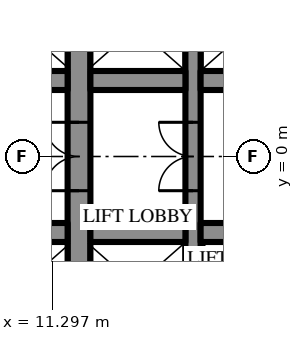
"""IFC4 building model, lengths in metres.
Left out: names, types, materials, properties, quantities, classifications, styles, units other than length and angle.
Written with IfcOpenShell. Run it as: python <this file> out.ifc"""

import sys

from ifc_helpers import new_model, si_unit, direction, frame, frame_2d, origin, place, context, subcontext, project, spatial, rectangle, extrude, element, fill, save


model = new_model("IFC4")
c1 = context("Model", 3, precision=1e-05, world=origin(), true_north=direction((0.0, 1.0)))
c2 = subcontext(c1, "Body", "Model", "MODEL_VIEW")
j1 = project(units=[si_unit("LENGTHUNIT", "METRE"), si_unit("PLANEANGLEUNIT", "RADIAN")], contexts=[c1])
p1 = place(None, origin())
s1 = spatial("IfcSite", under=j1, at=p1, CompositionType="ELEMENT")
p2 = place(p1, origin())
s2 = spatial("IfcBuilding", under=s1, at=p2, CompositionType="ELEMENT")
p3 = place(p2, frame((0.0, 0.0, 52.9)))
s3 = spatial("IfcBuildingStorey", under=s2, at=p3, CompositionType="ELEMENT", Elevation=52.9)
p4 = place(p3, frame((12.0, -10.7, 0.0), z_axis=(0.0, 0.0, 1.0), x_axis=(0.0, 1.0, 0.0)))
e1 = element("IfcWall", 1, at=p4, inside=s3, PredefinedType="SHEAR", context=c2, shape_type="SweptSolid", body=[
    extrude(rectangle(XDim=21.4, YDim=0.6, at=frame_2d((10.7, 0.0))), origin(), (0.0, 0.0, 1.0), 4.2),
])
p5 = place(p4, frame((9.8, 0.0, 0.0)))
e2 = element("IfcOpeningElement", 2, at=p5, cuts=e1, PredefinedType="OPENING", context=c2, shape_type="SweptSolid", body=[
    extrude(rectangle(XDim=1.8, YDim=2.4, at=frame_2d((0.9, 1.2))), frame((0.0, 0.31, 0.0), z_axis=(0.0, -1.0, 0.0), x_axis=(1.0, 0.0, 0.0)), (0.0, 0.0, 1.0), 0.62),
])
p6 = place(p3, frame((15.0, -10.7, 0.0), z_axis=(0.0, 0.0, 1.0), x_axis=(0.0, 1.0, 0.0)))
e3 = element("IfcWall", 3, at=p6, inside=s3, PredefinedType="SHEAR", context=c2, shape_type="SweptSolid", body=[
    extrude(rectangle(XDim=21.4, YDim=0.4, at=frame_2d((10.7, 0.0))), origin(), (0.0, 0.0, 1.0), 4.2),
])
p7 = place(p6, frame((9.8, 0.0, 0.0)))
e4 = element("IfcOpeningElement", 4, at=p7, cuts=e3, PredefinedType="OPENING", context=c2, shape_type="SweptSolid", body=[
    extrude(rectangle(XDim=1.8, YDim=2.4, at=frame_2d((0.9, 1.2))), frame((0.0, 0.21, 0.0), z_axis=(0.0, -1.0, 0.0), x_axis=(1.0, 0.0, 0.0)), (0.0, 0.0, 1.0), 0.42),
])
p8 = place(p3, frame((-3.2, 2.0, 0.0), z_axis=(0.0, 0.0, 1.0), x_axis=(1.0, 0.0, 0.0)))
e5 = element("IfcWall", 5, at=p8, inside=s3, PredefinedType="SHEAR", context=c2, shape_type="SweptSolid", body=[
    extrude(rectangle(XDim=14.9, YDim=0.5, at=frame_2d((7.45, 0.0))), origin(), (0.0, 0.0, 1.0), 4.2),
])
p9 = place(p8, frame((1.15, 0.0, 0.0)))
e6 = element("IfcOpeningElement", 6, at=p9, cuts=e5, PredefinedType="OPENING", context=c2, shape_type="SweptSolid", body=[
    extrude(rectangle(XDim=1.1, YDim=2.2, at=frame_2d((0.55, 1.1))), frame((0.0, 0.26, 0.0), z_axis=(0.0, -1.0, 0.0), x_axis=(1.0, 0.0, 0.0)), (0.0, 0.0, 1.0), 0.52),
])
p10 = place(p8, frame((4.15, 0.0, 0.0)))
e7 = element("IfcOpeningElement", 7, at=p10, cuts=e5, PredefinedType="OPENING", context=c2, shape_type="SweptSolid", body=[
    extrude(rectangle(XDim=1.1, YDim=2.2, at=frame_2d((0.55, 1.1))), frame((0.0, 0.26, 0.0), z_axis=(0.0, -1.0, 0.0), x_axis=(1.0, 0.0, 0.0)), (0.0, 0.0, 1.0), 0.52),
])
p11 = place(p8, frame((7.15, 0.0, 0.0)))
e8 = element("IfcOpeningElement", 8, at=p11, cuts=e5, PredefinedType="OPENING", context=c2, shape_type="SweptSolid", body=[
    extrude(rectangle(XDim=1.1, YDim=2.2, at=frame_2d((0.55, 1.1))), frame((0.0, 0.26, 0.0), z_axis=(0.0, -1.0, 0.0), x_axis=(1.0, 0.0, 0.0)), (0.0, 0.0, 1.0), 0.52),
])
p12 = place(p8, frame((10.15, 0.0, 0.0)))
e9 = element("IfcOpeningElement", 9, at=p12, cuts=e5, PredefinedType="OPENING", context=c2, shape_type="SweptSolid", body=[
    extrude(rectangle(XDim=1.1, YDim=2.2, at=frame_2d((0.55, 1.1))), frame((0.0, 0.26, 0.0), z_axis=(0.0, -1.0, 0.0), x_axis=(1.0, 0.0, 0.0)), (0.0, 0.0, 1.0), 0.52),
])
p13 = place(p3, frame((12.3, 2.0, 0.0), z_axis=(0.0, 0.0, 1.0), x_axis=(1.0, 0.0, 0.0)))
e10 = element("IfcWall", 10, at=p13, inside=s3, PredefinedType="SHEAR", context=c2, shape_type="SweptSolid", body=[
    extrude(rectangle(XDim=2.5, YDim=0.5, at=frame_2d((1.25, 0.0))), origin(), (0.0, 0.0, 1.0), 4.2),
])
for number, where, z_axis, x_axis in (
    (11, (15.2, 2.0, 0.0), (0.0, 0.0, 1.0), (1.0, 0.0, 0.0)),
    (12, (17.4, -2.0, 0.0), (0.0, 0.0, 1.0), (-1.0, 0.0, 0.0)),
):
    element("IfcWall", number, at=place(p3, frame(where, z_axis=z_axis, x_axis=x_axis)), inside=s3, PredefinedType="SHEAR", context=c2, shape_type="SweptSolid", body=[
        extrude(rectangle(XDim=2.2, YDim=0.5, at=frame_2d((1.1, 0.0))), origin(), (0.0, 0.0, 1.0), 4.2),
    ])
p14 = place(p3, frame((14.8, -2.0, 0.0), z_axis=(0.0, 0.0, 1.0), x_axis=(-1.0, 0.0, 0.0)))
e13 = element("IfcWall", 13, at=p14, inside=s3, PredefinedType="SHEAR", context=c2, shape_type="SweptSolid", body=[
    extrude(rectangle(XDim=2.5, YDim=0.5, at=frame_2d((1.25, 0.0))), origin(), (0.0, 0.0, 1.0), 4.2),
])
p15 = place(p3, frame((11.7, -2.0, 0.0), z_axis=(0.0, 0.0, 1.0), x_axis=(-1.0, 0.0, 0.0)))
e14 = element("IfcWall", 14, at=p15, inside=s3, PredefinedType="SHEAR", context=c2, shape_type="SweptSolid", body=[
    extrude(rectangle(XDim=5.9, YDim=0.5, at=frame_2d((2.95, 0.0))), origin(), (0.0, 0.0, 1.0), 4.2),
])
p16 = place(p5, origin())
e15 = element("IfcDoor", 15, at=p16, inside=s3, OperationType="DOUBLE_DOOR_SINGLE_SWING", PredefinedType="DOOR", context=c2, shape_type="SweptSolid", body=[
    extrude(rectangle(XDim=1.8, YDim=2.4, at=frame_2d((0.9, 1.2))), frame((0.0, 0.025, 0.0), z_axis=(0.0, -1.0, 0.0), x_axis=(1.0, 0.0, 0.0)), (0.0, 0.0, 1.0), 0.05),
])
fill(e2, e15)
p17 = place(p7, origin())
e16 = element("IfcDoor", 16, at=p17, inside=s3, OperationType="DOUBLE_DOOR_SINGLE_SWING", PredefinedType="DOOR", context=c2, shape_type="SweptSolid", body=[
    extrude(rectangle(XDim=1.8, YDim=2.4, at=frame_2d((0.9, 1.2))), frame((0.0, 0.025, 0.0), z_axis=(0.0, -1.0, 0.0), x_axis=(1.0, 0.0, 0.0)), (0.0, 0.0, 1.0), 0.05),
])
fill(e4, e16)
save(model, sys.argv[1])
